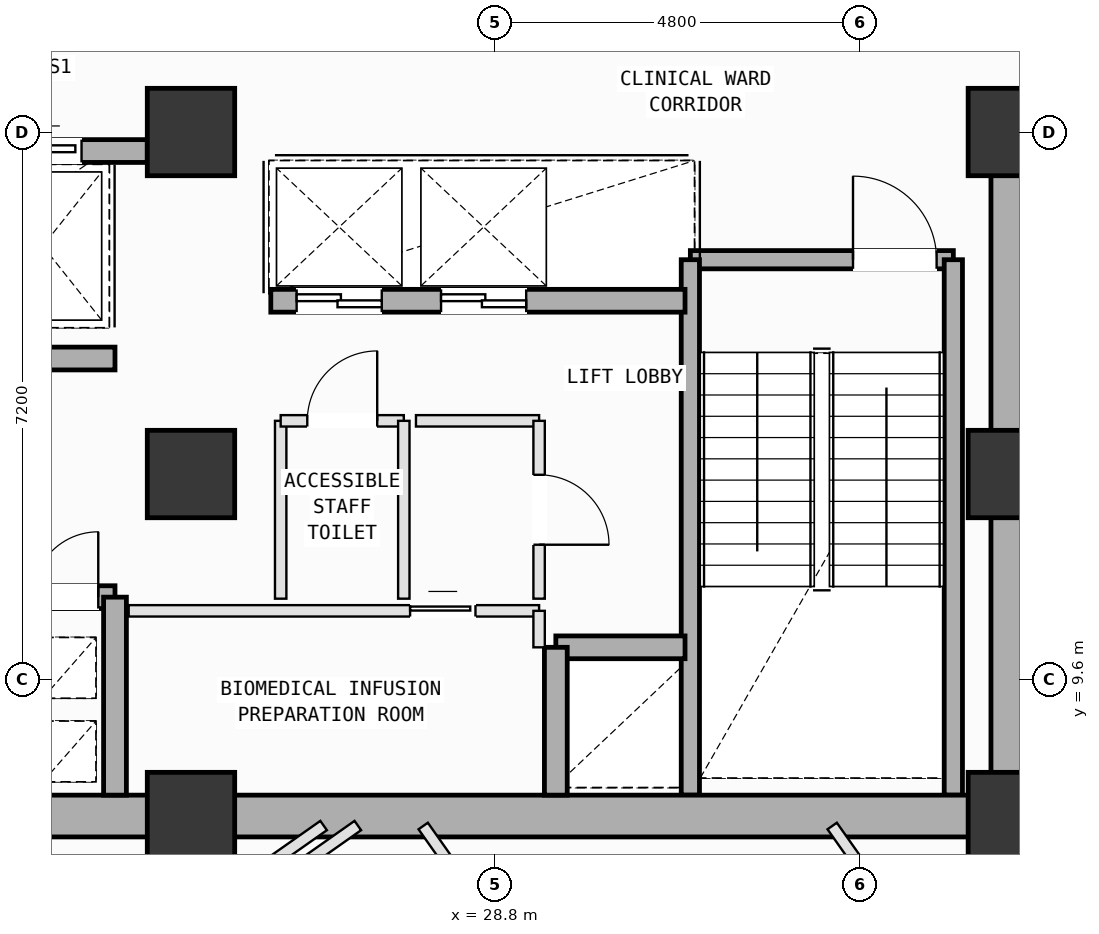
"""IFC4 building model, lengths in metres.
Left out: names, types, materials, properties, quantities, classifications, styles, units other than length and angle.
Written with IfcOpenShell. Run it as: python <this file> out.ifc"""

import sys

from ifc_helpers import new_model, si_unit, direction, frame, frame_2d, origin, origin_2d, place, context, subcontext, project, spatial, rectangle, extrude, element, fill, save


model = new_model("IFC4")
c1 = context("Model", 3, precision=1e-05, world=origin(), true_north=direction((0.0, 1.0)))
c2 = subcontext(c1, "Body", "Model", "MODEL_VIEW")
j1 = project(units=[si_unit("LENGTHUNIT", "METRE"), si_unit("PLANEANGLEUNIT", "RADIAN")], contexts=[c1])
p1 = place(None, origin())
s1 = spatial("IfcSite", under=j1, at=p1, CompositionType="ELEMENT")
p2 = place(p1, origin())
s2 = spatial("IfcBuilding", under=s1, at=p2, CompositionType="ELEMENT")
p3 = place(p2, frame((0.0, 0.0, 173.8)))
s3 = spatial("IfcBuildingStorey", under=s2, at=p3, CompositionType="ELEMENT", Elevation=173.8)
for number, where, z_axis, x_axis in (
    (1, (24.8, 7.8, 0.0), (0.0, 0.0, 1.0), (1.0, 0.0, 0.0)),
    (2, (24.8, 12.3, 0.0), (0.0, 0.0, 1.0), (1.0, 0.0, 0.0)),
    (3, (24.8, 16.8, 0.0), (0.0, 0.0, 1.0), (1.0, 0.0, 0.0)),
    (4, (35.6, 7.8, 0.0), (0.0, 0.0, 1.0), (1.0, 0.0, 0.0)),
    (5, (35.6, 12.3, 0.0), (0.0, 0.0, 1.0), (1.0, 0.0, 0.0)),
    (6, (35.6, 16.8, 0.0), (0.0, 0.0, 1.0), (1.0, 0.0, 0.0)),
):
    element("IfcColumn", number, at=place(p3, frame(where, z_axis=z_axis, x_axis=x_axis)), inside=s3, PredefinedType="COLUMN", context=c2, shape_type="SweptSolid", body=[
        extrude(rectangle(XDim=1.15, YDim=1.15, at=origin_2d()), origin(), (0.0, 0.0, 1.0), 4.0),
    ])
p4 = place(p3, frame((31.37, 15.12, 0.0), z_axis=(0.0, 0.0, 1.0), x_axis=(1.0, 0.0, 0.0)))
e7 = element("IfcWall", 7, at=p4, inside=s3, PredefinedType="SOLIDWALL", context=c2, shape_type="SweptSolid", body=[
    extrude(rectangle(XDim=3.46, YDim=0.24, at=frame_2d((1.73, 0.0))), origin(), (0.0, 0.0, 1.0), 3.78),
])
p5 = place(p4, frame((2.14, 0.0, 0.0)))
e8 = element("IfcOpeningElement", 8, at=p5, cuts=e7, PredefinedType="OPENING", context=c2, shape_type="SweptSolid", body=[
    extrude(rectangle(XDim=1.1, YDim=2.15, at=frame_2d((0.55, 1.075))), frame((0.0, 0.13, 0.0), z_axis=(0.0, -1.0, 0.0), x_axis=(1.0, 0.0, 0.0)), (0.0, 0.0, 1.0), 0.26),
])
for number, where, z_axis, x_axis in (
    (9, (34.83, 15.12, 0.0), (0.0, 0.0, 1.0), (0.0, -1.0, 0.0)),
    (10, (31.37, 8.075, 0.0), (0.0, 0.0, 1.0), (0.0, 1.0, 0.0)),
):
    element("IfcWall", number, at=place(p3, frame(where, z_axis=z_axis, x_axis=x_axis)), inside=s3, PredefinedType="SOLIDWALL", context=c2, shape_type="SweptSolid", body=[
        extrude(rectangle(XDim=7.045, YDim=0.24, at=frame_2d((3.522, 0.0))), origin(), (0.0, 0.0, 1.0), 3.78),
    ])
for number, where, z_axis, x_axis in (
    (11, (14.0, 7.8, 0.0), (0.0, 0.0, 1.0), (1.0, 0.0, 0.0)),
    (12, (24.8, 7.8, 0.0), (0.0, 0.0, 1.0), (1.0, 0.0, 0.0)),
):
    element("IfcWall", number, at=place(p3, frame(where, z_axis=z_axis, x_axis=x_axis)), inside=s3, PredefinedType="SHEAR", context=c2, shape_type="SweptSolid", body=[
        extrude(rectangle(XDim=10.8, YDim=0.55, at=frame_2d((5.4, 0.0))), origin(), (0.0, 0.0, 1.0), 3.78),
    ])
p6 = place(p3, frame((35.6, 7.8, 0.0), z_axis=(0.0, 0.0, 1.0), x_axis=(0.0, 1.0, 0.0)))
e13 = element("IfcWall", 13, at=p6, inside=s3, PredefinedType="SHEAR", context=c2, shape_type="SweptSolid", body=[
    extrude(rectangle(XDim=9.0, YDim=0.55, at=frame_2d((4.5, 0.0))), origin(), (0.0, 0.0, 1.0), 3.78),
])
p7 = place(p3, frame((19.85, 16.55, 0.0), z_axis=(0.0, 0.0, 1.0), x_axis=(1.0, 0.0, 0.0)))
e14 = element("IfcWall", 14, at=p7, inside=s3, PredefinedType="SOLIDWALL", context=c2, shape_type="SweptSolid", body=[
    extrude(rectangle(XDim=4.375, YDim=0.3, at=frame_2d((2.188, 0.0))), origin(), (0.0, 0.0, 1.0), 3.78),
])
p8 = place(p7, frame((0.475, 0.0, 0.0)))
e15 = element("IfcOpeningElement", 15, at=p8, cuts=e14, PredefinedType="OPENING", context=c2, shape_type="SweptSolid", body=[
    extrude(rectangle(XDim=1.25, YDim=2.18, at=frame_2d((0.625, 1.09))), frame((0.0, 0.16, 0.0), z_axis=(0.0, -1.0, 0.0), x_axis=(1.0, 0.0, 0.0)), (0.0, 0.0, 1.0), 0.32),
])
p9 = place(p7, frame((2.49, 0.0, 0.0)))
e16 = element("IfcOpeningElement", 16, at=p9, cuts=e14, PredefinedType="OPENING", context=c2, shape_type="SweptSolid", body=[
    extrude(rectangle(XDim=1.02, YDim=2.12, at=frame_2d((0.51, 1.06))), frame((0.0, 0.16, 0.0), z_axis=(0.0, -1.0, 0.0), x_axis=(1.0, 0.0, 0.0)), (0.0, 0.0, 1.0), 0.32),
])
p10 = place(p3, frame((18.5, 10.68, 0.0), z_axis=(0.0, 0.0, 1.0), x_axis=(1.0, 0.0, 0.0)))
e17 = element("IfcWall", 17, at=p10, inside=s3, PredefinedType="SOLIDWALL", context=c2, shape_type="SweptSolid", body=[
    extrude(rectangle(XDim=5.3, YDim=0.3, at=frame_2d((2.65, 0.0))), origin(), (0.0, 0.0, 1.0), 3.78),
])
p11 = place(p10, frame((4.22, 0.0, 0.0)))
e18 = element("IfcOpeningElement", 18, at=p11, cuts=e17, PredefinedType="OPENING", context=c2, shape_type="SweptSolid", body=[
    extrude(rectangle(XDim=0.86, YDim=2.06, at=frame_2d((0.43, 1.03))), frame((0.0, 0.16, 0.0), z_axis=(0.0, -1.0, 0.0), x_axis=(1.0, 0.0, 0.0)), (0.0, 0.0, 1.0), 0.32),
])
p12 = place(p10, frame((0.425, 0.0, 0.0)))
e19 = element("IfcOpeningElement", 19, at=p12, cuts=e17, PredefinedType="OPENING", context=c2, shape_type="SweptSolid", body=[
    extrude(rectangle(XDim=1.25, YDim=2.18, at=frame_2d((0.625, 1.09))), frame((0.0, 0.16, 0.0), z_axis=(0.0, -1.0, 0.0), x_axis=(1.0, 0.0, 0.0)), (0.0, 0.0, 1.0), 0.32),
])
p13 = place(p10, frame((2.525, 0.0, 0.0)))
e20 = element("IfcOpeningElement", 20, at=p13, cuts=e17, PredefinedType="OPENING", context=c2, shape_type="SweptSolid", body=[
    extrude(rectangle(XDim=1.25, YDim=2.18, at=frame_2d((0.625, 1.09))), frame((0.0, 0.16, 0.0), z_axis=(0.0, -1.0, 0.0), x_axis=(1.0, 0.0, 0.0)), (0.0, 0.0, 1.0), 0.32),
])
p14 = place(p3, frame((18.5, 13.82, 0.0), z_axis=(0.0, 0.0, 1.0), x_axis=(1.0, 0.0, 0.0)))
e21 = element("IfcWall", 21, at=p14, inside=s3, PredefinedType="SOLIDWALL", context=c2, shape_type="SweptSolid", body=[
    extrude(rectangle(XDim=5.3, YDim=0.3, at=frame_2d((2.65, 0.0))), origin(), (0.0, 0.0, 1.0), 3.78),
])
p15 = place(p14, frame((0.18, 0.0, 0.0)))
e22 = element("IfcOpeningElement", 22, at=p15, cuts=e21, PredefinedType="OPENING", context=c2, shape_type="SweptSolid", body=[
    extrude(rectangle(XDim=1.1, YDim=2.15, at=frame_2d((0.55, 1.075))), frame((0.0, 0.16, 0.0), z_axis=(0.0, -1.0, 0.0), x_axis=(1.0, 0.0, 0.0)), (0.0, 0.0, 1.0), 0.32),
])
p16 = place(p3, frame((23.8, 8.075, 0.0), z_axis=(0.0, 0.0, 1.0), x_axis=(0.0, 1.0, 0.0)))
e23 = element("IfcWall", 23, at=p16, inside=s3, PredefinedType="SOLIDWALL", context=c2, shape_type="SweptSolid", body=[
    extrude(rectangle(XDim=2.605, YDim=0.3, at=frame_2d((1.302, 0.0))), origin(), (0.0, 0.0, 1.0), 3.78),
])
p17 = place(p3, frame((29.6, 10.02, 0.0), z_axis=(0.0, 0.0, 1.0), x_axis=(1.0, 0.0, 0.0)))
e24 = element("IfcWall", 24, at=p17, inside=s3, PredefinedType="SOLIDWALL", context=c2, shape_type="SweptSolid", body=[
    extrude(rectangle(XDim=1.7, YDim=0.3, at=frame_2d((0.85, 0.0))), origin(), (0.0, 0.0, 1.0), 3.78),
])
p18 = place(p3, frame((29.6, 8.075, 0.0), z_axis=(0.0, 0.0, 1.0), x_axis=(0.0, 1.0, 0.0)))
e25 = element("IfcWall", 25, at=p18, inside=s3, PredefinedType="SOLIDWALL", context=c2, shape_type="SweptSolid", body=[
    extrude(rectangle(XDim=1.945, YDim=0.3, at=frame_2d((0.973, 0.0))), origin(), (0.0, 0.0, 1.0), 3.78),
])
p19 = place(p3, frame((25.85, 14.58, 0.0), z_axis=(0.0, 0.0, 1.0), x_axis=(1.0, 0.0, 0.0)))
e26 = element("IfcWall", 26, at=p19, inside=s3, PredefinedType="SOLIDWALL", context=c2, shape_type="SweptSolid", body=[
    extrude(rectangle(XDim=5.45, YDim=0.3, at=frame_2d((2.725, 0.0))), origin(), (0.0, 0.0, 1.0), 3.78),
])
p20 = place(p19, frame((0.34, 0.0, 0.0)))
e27 = element("IfcOpeningElement", 27, at=p20, cuts=e26, PredefinedType="OPENING", context=c2, shape_type="SweptSolid", body=[
    extrude(rectangle(XDim=1.12, YDim=2.15, at=frame_2d((0.56, 1.075))), frame((0.0, 0.16, 0.0), z_axis=(0.0, -1.0, 0.0), x_axis=(1.0, 0.0, 0.0)), (0.0, 0.0, 1.0), 0.32),
])
p21 = place(p19, frame((2.24, 0.0, 0.0)))
e28 = element("IfcOpeningElement", 28, at=p21, cuts=e26, PredefinedType="OPENING", context=c2, shape_type="SweptSolid", body=[
    extrude(rectangle(XDim=1.12, YDim=2.15, at=frame_2d((0.56, 1.075))), frame((0.0, 0.16, 0.0), z_axis=(0.0, -1.0, 0.0), x_axis=(1.0, 0.0, 0.0)), (0.0, 0.0, 1.0), 0.32),
])
p22 = place(p3, frame((23.98, 10.5, 0.0), z_axis=(0.0, 0.0, 1.0), x_axis=(1.0, 0.0, 0.0)))
e29 = element("IfcWall", 29, at=p22, inside=s3, PredefinedType="PARTITIONING", context=c2, shape_type="SweptSolid", body=[
    extrude(rectangle(XDim=5.4, YDim=0.15, at=frame_2d((2.7, 0.0))), origin(), (0.0, 0.0, 1.0), 3.78),
])
p23 = place(p22, frame((3.703, 0.0, 0.0)))
e30 = element("IfcOpeningElement", 30, at=p23, cuts=e29, PredefinedType="OPENING", context=c2, shape_type="SweptSolid", body=[
    extrude(rectangle(XDim=0.86, YDim=2.06, at=frame_2d((0.43, 1.03))), frame((0.0, 0.085, 0.0), z_axis=(0.0, -1.0, 0.0), x_axis=(1.0, 0.0, 0.0)), (0.0, 0.0, 1.0), 0.17),
])
p24 = place(p3, frame((29.38, 10.5, 0.0), z_axis=(0.0, 0.0, 1.0), x_axis=(0.0, -1.0, 0.0)))
e31 = element("IfcWall", 31, at=p24, inside=s3, PredefinedType="PARTITIONING", context=c2, shape_type="SweptSolid", body=[
    extrude(rectangle(XDim=0.48, YDim=0.15, at=frame_2d((0.24, 0.0))), origin(), (0.0, 0.0, 1.0), 3.78),
])
p25 = place(p3, frame((25.98, 10.66, 0.0), z_axis=(0.0, 0.0, 1.0), x_axis=(0.0, 1.0, 0.0)))
e32 = element("IfcWall", 32, at=p25, inside=s3, PredefinedType="PARTITIONING", context=c2, shape_type="SweptSolid", body=[
    extrude(rectangle(XDim=2.34, YDim=0.15, at=frame_2d((1.17, 0.0))), origin(), (0.0, 0.0, 1.0), 3.78),
])
p26 = place(p3, frame((25.98, 13.0, 0.0), z_axis=(0.0, 0.0, 1.0), x_axis=(1.0, 0.0, 0.0)))
e33 = element("IfcWall", 33, at=p26, inside=s3, PredefinedType="PARTITIONING", context=c2, shape_type="SweptSolid", body=[
    extrude(rectangle(XDim=1.62, YDim=0.15, at=frame_2d((0.81, 0.0))), origin(), (0.0, 0.0, 1.0), 3.78),
])
p27 = place(p26, frame((0.35, 0.0, 0.0)))
e34 = element("IfcOpeningElement", 34, at=p27, cuts=e33, PredefinedType="OPENING", context=c2, shape_type="SweptSolid", body=[
    extrude(rectangle(XDim=0.92, YDim=2.1, at=frame_2d((0.46, 1.05))), frame((0.0, 0.085, 0.0), z_axis=(0.0, -1.0, 0.0), x_axis=(1.0, 0.0, 0.0)), (0.0, 0.0, 1.0), 0.17),
])
p28 = place(p3, frame((27.6, 13.0, 0.0), z_axis=(0.0, 0.0, 1.0), x_axis=(0.0, -1.0, 0.0)))
e35 = element("IfcWall", 35, at=p28, inside=s3, PredefinedType="PARTITIONING", context=c2, shape_type="SweptSolid", body=[
    extrude(rectangle(XDim=2.34, YDim=0.15, at=frame_2d((1.17, 0.0))), origin(), (0.0, 0.0, 1.0), 3.78),
])
p29 = place(p3, frame((27.76, 13.0, 0.0), z_axis=(0.0, 0.0, 1.0), x_axis=(1.0, 0.0, 0.0)))
e36 = element("IfcWall", 36, at=p29, inside=s3, PredefinedType="PARTITIONING", context=c2, shape_type="SweptSolid", body=[
    extrude(rectangle(XDim=1.62, YDim=0.15, at=frame_2d((0.81, 0.0))), origin(), (0.0, 0.0, 1.0), 3.78),
])
p30 = place(p3, frame((29.38, 13.0, 0.0), z_axis=(0.0, 0.0, 1.0), x_axis=(0.0, -1.0, 0.0)))
e37 = element("IfcWall", 37, at=p30, inside=s3, PredefinedType="PARTITIONING", context=c2, shape_type="SweptSolid", body=[
    extrude(rectangle(XDim=2.34, YDim=0.15, at=frame_2d((1.17, 0.0))), origin(), (0.0, 0.0, 1.0), 3.78),
])
p31 = place(p30, frame((0.71, 0.0, 0.0)))
e38 = element("IfcOpeningElement", 38, at=p31, cuts=e37, PredefinedType="OPENING", context=c2, shape_type="SweptSolid", body=[
    extrude(rectangle(XDim=0.92, YDim=2.1, at=frame_2d((0.46, 1.05))), frame((0.0, 0.085, 0.0), z_axis=(0.0, -1.0, 0.0), x_axis=(1.0, 0.0, 0.0)), (0.0, 0.0, 1.0), 0.17),
])
p32 = place(p3, frame((24.101, 5.636, 0.0), z_axis=(0.0, 0.0, 1.0), x_axis=(0.817472101836, 0.575968195928, 0.0)))
e39 = element("IfcWall", 39, at=p32, inside=s3, PredefinedType="PARTITIONING", context=c2, shape_type="SweptSolid", body=[
    extrude(rectangle(XDim=3.54, YDim=0.15, at=frame_2d((1.77, 0.0))), origin(), (0.0, 0.0, 1.0), 3.78),
])
p33 = place(p3, frame((27.855, 7.669, 0.0), z_axis=(0.0, 0.0, 1.0), x_axis=(0.57575409581, -0.8176229089, 0.0)))
e40 = element("IfcWall", 40, at=p33, inside=s3, PredefinedType="PARTITIONING", context=c2, shape_type="SweptSolid", body=[
    extrude(rectangle(XDim=11.435, YDim=0.15, at=frame_2d((5.718, 0.0))), origin(), (0.0, 0.0, 1.0), 3.78),
])
p34 = place(p33, frame((5.471, 0.0, 0.0)))
e41 = element("IfcOpeningElement", 41, at=p34, cuts=e40, PredefinedType="OPENING", context=c2, shape_type="SweptSolid", body=[
    extrude(rectangle(XDim=0.86, YDim=2.06, at=frame_2d((0.43, 1.03))), frame((0.0, 0.085, 0.0), z_axis=(0.0, -1.0, 0.0), x_axis=(1.0, 0.0, 0.0)), (0.0, 0.0, 1.0), 0.17),
])
p35 = place(p3, frame((33.236, 7.669, 0.0), z_axis=(0.0, 0.0, 1.0), x_axis=(0.575764322931, -0.817615707065, 0.0)))
e42 = element("IfcWall", 42, at=p35, inside=s3, PredefinedType="PARTITIONING", context=c2, shape_type="SweptSolid", body=[
    extrude(rectangle(XDim=8.682, YDim=0.15, at=frame_2d((4.341, 0.0))), origin(), (0.0, 0.0, 1.0), 3.78),
])
p36 = place(p35, frame((4.095, 0.0, 0.0)))
e43 = element("IfcOpeningElement", 43, at=p36, cuts=e42, PredefinedType="OPENING", context=c2, shape_type="SweptSolid", body=[
    extrude(rectangle(XDim=0.86, YDim=2.06, at=frame_2d((0.43, 1.03))), frame((0.0, 0.085, 0.0), z_axis=(0.0, -1.0, 0.0), x_axis=(1.0, 0.0, 0.0)), (0.0, 0.0, 1.0), 0.17),
])
p37 = place(p3, frame((35.6, 7.5, 0.0), z_axis=(0.0, 0.0, 1.0), x_axis=(1.0, 0.0, 0.0)))
e44 = element("IfcWall", 44, at=p37, inside=s3, PredefinedType="PARTITIONING", context=c2, shape_type="SweptSolid", body=[
    extrude(rectangle(XDim=0.55, YDim=0.15, at=frame_2d((0.275, 0.0))), origin(), (0.0, 0.0, 1.0), 3.065),
])
p38 = place(p3, frame((26.545, 7.675, 0.0), z_axis=(0.0, 0.0, 1.0), x_axis=(-0.817707532324, -0.575633904127, 0.0)))
e45 = element("IfcWall", 45, at=p38, inside=s3, PredefinedType="PARTITIONING", context=c2, shape_type="SweptSolid", body=[
    extrude(rectangle(XDim=11.707, YDim=0.15, at=frame_2d((5.854, 0.0))), origin(), (0.0, 0.0, 1.0), 3.78),
])
p39 = place(p5, origin())
e46 = element("IfcDoor", 46, at=p39, inside=s3, OperationType="SINGLE_SWING_LEFT", PredefinedType="DOOR", context=c2, shape_type="SweptSolid", body=[
    extrude(rectangle(XDim=1.1, YDim=2.15, at=frame_2d((0.55, 1.075))), frame((0.0, 0.025, 0.0), z_axis=(0.0, -1.0, 0.0), x_axis=(1.0, 0.0, 0.0)), (0.0, 0.0, 1.0), 0.05),
])
fill(e8, e46)
p40 = place(p11, origin())
e47 = element("IfcDoor", 47, at=p40, inside=s3, OperationType="SINGLE_SWING_RIGHT", PredefinedType="DOOR", context=c2, shape_type="SweptSolid", body=[
    extrude(rectangle(XDim=0.86, YDim=2.06, at=frame_2d((0.43, 1.03))), frame((0.0, 0.025, 0.0), z_axis=(0.0, -1.0, 0.0), x_axis=(1.0, 0.0, 0.0)), (0.0, 0.0, 1.0), 0.05),
])
fill(e18, e47)
p41 = place(p20, origin())
e48 = element("IfcDoor", 48, at=p41, inside=s3, OperationType="DOUBLE_DOOR_SLIDING", PredefinedType="DOOR", context=c2, shape_type="SweptSolid", body=[
    extrude(rectangle(XDim=1.12, YDim=2.15, at=frame_2d((0.56, 1.075))), frame((0.0, 0.025, 0.0), z_axis=(0.0, -1.0, 0.0), x_axis=(1.0, 0.0, 0.0)), (0.0, 0.0, 1.0), 0.05),
])
fill(e27, e48)
p42 = place(p21, origin())
e49 = element("IfcDoor", 49, at=p42, inside=s3, OperationType="DOUBLE_DOOR_SLIDING", PredefinedType="DOOR", context=c2, shape_type="SweptSolid", body=[
    extrude(rectangle(XDim=1.12, YDim=2.15, at=frame_2d((0.56, 1.075))), frame((0.0, 0.025, 0.0), z_axis=(0.0, -1.0, 0.0), x_axis=(1.0, 0.0, 0.0)), (0.0, 0.0, 1.0), 0.05),
])
fill(e28, e49)
p43 = place(p9, origin())
e50 = element("IfcDoor", 50, at=p43, inside=s3, OperationType="SLIDING_TO_LEFT", PredefinedType="DOOR", context=c2, shape_type="SweptSolid", body=[
    extrude(rectangle(XDim=1.02, YDim=2.12, at=frame_2d((0.51, 1.06))), frame((0.0, 0.025, 0.0), z_axis=(0.0, -1.0, 0.0), x_axis=(1.0, 0.0, 0.0)), (0.0, 0.0, 1.0), 0.05),
])
fill(e16, e50)
p44 = place(p27, origin())
e51 = element("IfcDoor", 51, at=p44, inside=s3, OperationType="SINGLE_SWING_RIGHT", PredefinedType="DOOR", context=c2, shape_type="SweptSolid", body=[
    extrude(rectangle(XDim=0.92, YDim=2.1, at=frame_2d((0.46, 1.05))), frame((0.0, 0.025, 0.0), z_axis=(0.0, -1.0, 0.0), x_axis=(1.0, 0.0, 0.0)), (0.0, 0.0, 1.0), 0.05),
])
fill(e34, e51)
p45 = place(p31, origin())
e52 = element("IfcDoor", 52, at=p45, inside=s3, OperationType="SINGLE_SWING_RIGHT", PredefinedType="DOOR", context=c2, shape_type="SweptSolid", body=[
    extrude(rectangle(XDim=0.92, YDim=2.1, at=frame_2d((0.46, 1.05))), frame((0.0, 0.025, 0.0), z_axis=(0.0, -1.0, 0.0), x_axis=(1.0, 0.0, 0.0)), (0.0, 0.0, 1.0), 0.05),
])
fill(e38, e52)
p46 = place(p23, origin())
e53 = element("IfcDoor", 53, at=p46, inside=s3, OperationType="SLIDING_TO_LEFT", PredefinedType="DOOR", context=c2, shape_type="SweptSolid", body=[
    extrude(rectangle(XDim=0.86, YDim=2.06, at=frame_2d((0.43, 1.03))), frame((0.0, 0.025, 0.0), z_axis=(0.0, -1.0, 0.0), x_axis=(1.0, 0.0, 0.0)), (0.0, 0.0, 1.0), 0.05),
])
fill(e30, e53)
save(model, sys.argv[1])
